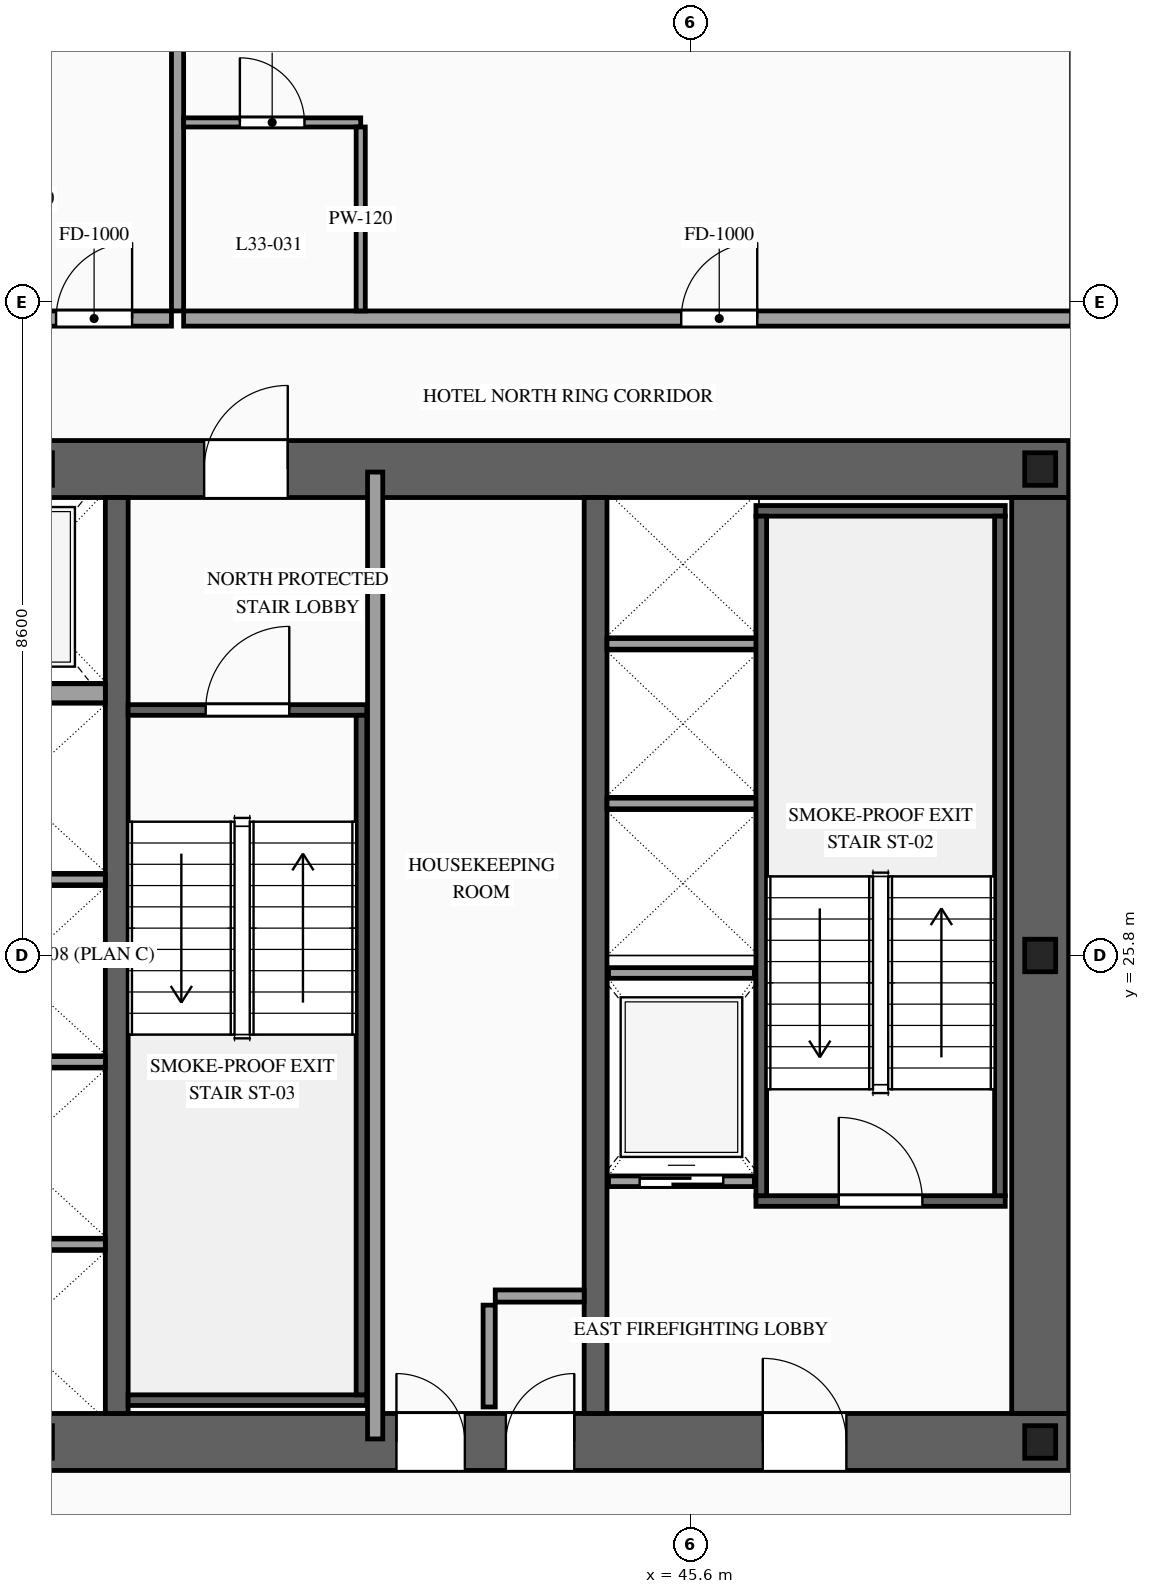
"""IFC4 building model, lengths in metres.
Left out: names, types, materials, properties, quantities, classifications, styles, units other than length and angle.
Written with IfcOpenShell. Run it as: python <this file> out.ifc"""

import sys

from ifc_helpers import new_model, si_unit, direction, frame, frame_2d, origin, origin_2d, place, context, subcontext, project, spatial, rectangle, i_section, extrude, source, transform, mapped, element, fill, save


model = new_model("IFC4")
c1 = context("Model", 3, precision=1e-05, world=origin(), true_north=direction((0.0, 1.0)))
c2 = subcontext(c1, "Body", "Model", "MODEL_VIEW")
j1 = project(units=[si_unit("LENGTHUNIT", "METRE"), si_unit("PLANEANGLEUNIT", "RADIAN")], contexts=[c1])
p1 = place(None, origin())
s1 = spatial("IfcSite", under=j1, at=p1, CompositionType="ELEMENT")
p2 = place(p1, origin())
s2 = spatial("IfcBuilding", under=s1, at=p2, CompositionType="ELEMENT")
p3 = place(p2, frame((0.0, 0.0, 126.2)))
s3 = spatial("IfcBuildingStorey", under=s2, at=p3, CompositionType="ELEMENT", Elevation=126.2)
p4 = place(p3, frame((23.425, 19.4, 0.0), z_axis=(0.0, 0.0, 1.0), x_axis=(1.0, 0.0, 0.0)))
e1 = element("IfcWall", 1, at=p4, inside=s3, PredefinedType="SHEAR", context=c2, shape_type="SweptSolid", body=[
    extrude(rectangle(XDim=27.15, YDim=0.75, at=frame_2d((13.575, 0.0))), origin(), (0.0, 0.0, 1.0), 3.6),
])
p5 = place(p4, frame((2.025, 0.0, 0.0)))
e2 = element("IfcOpeningElement", 2, at=p5, cuts=e1, PredefinedType="OPENING", context=c2, shape_type="SweptSolid", body=[
    extrude(rectangle(XDim=1.1, YDim=2.2, at=frame_2d((0.55, 1.1))), frame((0.0, 0.39, 0.0), z_axis=(0.0, -1.0, 0.0), x_axis=(1.0, 0.0, 0.0)), (0.0, 0.0, 1.0), 0.78),
])
p6 = place(p4, frame((9.925, 0.0, 0.0)))
e3 = element("IfcOpeningElement", 3, at=p6, cuts=e1, PredefinedType="OPENING", context=c2, shape_type="SweptSolid", body=[
    extrude(rectangle(XDim=1.1, YDim=2.2, at=frame_2d((0.55, 1.1))), frame((0.0, 0.39, 0.0), z_axis=(0.0, -1.0, 0.0), x_axis=(1.0, 0.0, 0.0)), (0.0, 0.0, 1.0), 0.78),
])
p7 = place(p4, frame((23.125, 0.0, 0.0)))
e4 = element("IfcOpeningElement", 4, at=p7, cuts=e1, PredefinedType="OPENING", context=c2, shape_type="SweptSolid", body=[
    extrude(rectangle(XDim=1.1, YDim=2.2, at=frame_2d((0.55, 1.1))), frame((0.0, 0.39, 0.0), z_axis=(0.0, -1.0, 0.0), x_axis=(1.0, 0.0, 0.0)), (0.0, 0.0, 1.0), 0.78),
])
p8 = place(p4, frame((19.745, 0.0, 0.0)))
e5 = element("IfcOpeningElement", 5, at=p8, cuts=e1, PredefinedType="OPENING", context=c2, shape_type="SweptSolid", body=[
    extrude(rectangle(XDim=0.9, YDim=2.15, at=frame_2d((0.45, 1.075))), frame((0.0, 0.39, 0.0), z_axis=(0.0, -1.0, 0.0), x_axis=(1.0, 0.0, 0.0)), (0.0, 0.0, 1.0), 0.78),
])
p9 = place(p4, frame((18.305, 0.0, 0.0)))
e6 = element("IfcOpeningElement", 6, at=p9, cuts=e1, PredefinedType="OPENING", context=c2, shape_type="SweptSolid", body=[
    extrude(rectangle(XDim=0.9, YDim=2.15, at=frame_2d((0.45, 1.075))), frame((0.0, 0.39, 0.0), z_axis=(0.0, -1.0, 0.0), x_axis=(1.0, 0.0, 0.0)), (0.0, 0.0, 1.0), 0.78),
])
p10 = place(p3, frame((23.425, 32.2, 0.0), z_axis=(0.0, 0.0, 1.0), x_axis=(1.0, 0.0, 0.0)))
e7 = element("IfcWall", 7, at=p10, inside=s3, PredefinedType="SHEAR", context=c2, shape_type="SweptSolid", body=[
    extrude(rectangle(XDim=27.15, YDim=0.75, at=frame_2d((13.575, 0.0))), origin(), (0.0, 0.0, 1.0), 3.6),
])
p11 = place(p10, frame((4.645, 0.0, 0.0)))
e8 = element("IfcOpeningElement", 8, at=p11, cuts=e7, PredefinedType="OPENING", context=c2, shape_type="SweptSolid", body=[
    extrude(rectangle(XDim=0.9, YDim=2.15, at=frame_2d((0.45, 1.075))), frame((0.0, 0.39, 0.0), z_axis=(0.0, -1.0, 0.0), x_axis=(1.0, 0.0, 0.0)), (0.0, 0.0, 1.0), 0.78),
])
p12 = place(p10, frame((9.925, 0.0, 0.0)))
e9 = element("IfcOpeningElement", 9, at=p12, cuts=e7, PredefinedType="OPENING", context=c2, shape_type="SweptSolid", body=[
    extrude(rectangle(XDim=1.1, YDim=2.2, at=frame_2d((0.55, 1.1))), frame((0.0, 0.39, 0.0), z_axis=(0.0, -1.0, 0.0), x_axis=(1.0, 0.0, 0.0)), (0.0, 0.0, 1.0), 0.78),
])
p13 = place(p10, frame((15.775, 0.0, 0.0)))
e10 = element("IfcOpeningElement", 10, at=p13, cuts=e7, PredefinedType="OPENING", context=c2, shape_type="SweptSolid", body=[
    extrude(rectangle(XDim=1.1, YDim=2.2, at=frame_2d((0.55, 1.1))), frame((0.0, 0.39, 0.0), z_axis=(0.0, -1.0, 0.0), x_axis=(1.0, 0.0, 0.0)), (0.0, 0.0, 1.0), 0.78),
])
m1 = source(origin(), c2, "Body", "SweptSolid", [
    extrude(rectangle(XDim=12.05, YDim=0.75, at=frame_2d((6.025, 0.0))), origin(), (0.0, 0.0, 1.0), 3.6),
])
p14 = place(p3, frame((50.2, 19.775, 0.0), z_axis=(0.0, 0.0, 1.0), x_axis=(0.0, 1.0, 0.0)))
e11 = element("IfcWall", 11, at=p14, inside=s3, PredefinedType="SHEAR", context=c2, shape_type="MappedRepresentation", body=[
    mapped(m1, transform((0.0, 0.0, 0.0), scale=1.0)),
])
m2 = source(origin(), c2, "Body", "SweptSolid", [
    extrude(rectangle(XDim=12.05, YDim=0.3, at=frame_2d((6.025, 0.0))), origin(), (0.0, 0.0, 1.0), 3.6),
])
for number, where, z_axis, x_axis in (
    (12, (38.05, 19.775, 0.0), (0.0, 0.0, 1.0), (0.0, 1.0, 0.0)),
    (13, (44.35, 19.775, 0.0), (0.0, 0.0, 1.0), (0.0, 1.0, 0.0)),
):
    element("IfcWall", number, at=place(p3, frame(where, z_axis=z_axis, x_axis=x_axis)), inside=s3, PredefinedType="SOLIDWALL", context=c2, shape_type="MappedRepresentation", body=[
        mapped(m2, transform((0.0, 0.0, 0.0), scale=1.0)),
    ])
m3 = source(origin(), c2, "Body", "SweptSolid", [
    extrude(i_section(OverallWidth=0.407, OverallDepth=0.428, WebThickness=0.02, FlangeThickness=0.035, at=origin_2d()), origin(), (0.0, 0.0, 1.0), 3.6),
])
for number, where, z_axis, x_axis in (
    (14, (37.0, 19.4, 0.0), (0.0, 0.0, 1.0), (1.0, 0.0, 0.0)),
    (15, (50.2, 19.4, 0.0), (0.0, 0.0, 1.0), (1.0, 0.0, 0.0)),
    (16, (50.2, 25.8, 0.0), (0.0, 0.0, 1.0), (1.0, 0.0, 0.0)),
    (17, (37.0, 32.2, 0.0), (0.0, 0.0, 1.0), (1.0, 0.0, 0.0)),
    (18, (50.2, 32.2, 0.0), (0.0, 0.0, 1.0), (1.0, 0.0, 0.0)),
):
    element("IfcColumn", number, at=place(p3, frame(where, z_axis=z_axis, x_axis=x_axis)), inside=s3, PredefinedType="COLUMN", context=c2, shape_type="MappedRepresentation", body=[
        mapped(m3, transform((0.0, 0.0, 0.0), scale=1.0)),
    ])
p15 = place(p3, frame((44.52, 22.83, 0.0), z_axis=(0.0, 0.0, 1.0), x_axis=(1.0, 0.0, 0.0)))
e19 = element("IfcWall", 19, at=p15, inside=s3, PredefinedType="SOLIDWALL", context=c2, shape_type="SweptSolid", body=[
    extrude(rectangle(XDim=1.92, YDim=0.14, at=frame_2d((0.96, 0.0))), origin(), (0.0, 0.0, 1.0), 3.32),
])
p16 = place(p15, frame((0.41, 0.0, 0.0)))
e20 = element("IfcOpeningElement", 20, at=p16, cuts=e19, PredefinedType="OPENING", context=c2, shape_type="SweptSolid", body=[
    extrude(rectangle(XDim=1.1, YDim=2.2, at=frame_2d((0.55, 1.1))), frame((0.0, 0.085, 0.0), z_axis=(0.0, -1.0, 0.0), x_axis=(1.0, 0.0, 0.0)), (0.0, 0.0, 1.0), 0.17),
])
m4 = source(origin(), c2, "Body", "SweptSolid", [
    extrude(rectangle(XDim=1.92, YDim=0.14, at=frame_2d((0.96, 0.0))), origin(), (0.0, 0.0, 1.0), 3.32),
])
p17 = place(p3, frame((44.52, 25.57, 0.0), z_axis=(0.0, 0.0, 1.0), x_axis=(1.0, 0.0, 0.0)))
e21 = element("IfcWall", 21, at=p17, inside=s3, PredefinedType="SOLIDWALL", context=c2, shape_type="MappedRepresentation", body=[
    mapped(m4, transform((0.0, 0.0, 0.0), scale=1.0)),
])
m5 = source(origin(), c2, "Body", "SweptSolid", [
    extrude(rectangle(XDim=2.4, YDim=0.14, at=frame_2d((1.2, 0.0))), origin(), (0.0, 0.0, 1.0), 3.32),
])
for number, where, z_axis, x_axis in (
    (22, (35.5, 22.0, 0.0), (0.0, 0.0, 1.0), (1.0, 0.0, 0.0)),
    (23, (35.5, 24.4, 0.0), (0.0, 0.0, 1.0), (1.0, 0.0, 0.0)),
    (24, (35.5, 26.8, 0.0), (0.0, 0.0, 1.0), (1.0, 0.0, 0.0)),
):
    element("IfcWall", number, at=place(p3, frame(where, z_axis=z_axis, x_axis=x_axis)), inside=s3, PredefinedType="SOLIDWALL", context=c2, shape_type="MappedRepresentation", body=[
        mapped(m5, transform((0.0, 0.0, 0.0), scale=1.0)),
    ])
m6 = source(origin(), c2, "Body", "SweptSolid", [
    extrude(rectangle(XDim=2.4, YDim=0.25, at=frame_2d((1.2, 0.0))), origin(), (0.0, 0.0, 1.0), 3.32),
])
p18 = place(p3, frame((35.5, 29.25, 0.0), z_axis=(0.0, 0.0, 1.0), x_axis=(1.0, 0.0, 0.0)))
e25 = element("IfcWall", 25, at=p18, inside=s3, PredefinedType="SOLIDWALL", context=c2, shape_type="MappedRepresentation", body=[
    mapped(m6, transform((0.0, 0.0, 0.0), scale=1.0)),
])
m7 = source(origin(), c2, "Body", "SweptSolid", [
    extrude(rectangle(XDim=2.0, YDim=0.14, at=frame_2d((1.0, 0.0))), origin(), (0.0, 0.0, 1.0), 3.32),
])
for number, where, z_axis, x_axis in (
    (26, (44.5, 27.8, 0.0), (0.0, 0.0, 1.0), (1.0, 0.0, 0.0)),
    (27, (44.5, 29.9, 0.0), (0.0, 0.0, 1.0), (1.0, 0.0, 0.0)),
):
    element("IfcWall", number, at=place(p3, frame(where, z_axis=z_axis, x_axis=x_axis)), inside=s3, PredefinedType="SOLIDWALL", context=c2, shape_type="MappedRepresentation", body=[
        mapped(m7, transform((0.0, 0.0, 0.0), scale=1.0)),
    ])
p19 = place(p3, frame((46.46, 22.57, 0.0), z_axis=(0.0, 0.0, 1.0), x_axis=(1.0, 0.0, 0.0)))
e28 = element("IfcWall", 28, at=p19, inside=s3, PredefinedType="SOLIDWALL", context=c2, shape_type="SweptSolid", body=[
    extrude(rectangle(XDim=3.28, YDim=0.14, at=frame_2d((1.64, 0.0))), origin(), (0.0, 0.0, 1.0), 3.32),
])
p20 = place(p19, frame((1.09, 0.0, 0.0)))
e29 = element("IfcOpeningElement", 29, at=p20, cuts=e28, PredefinedType="OPENING", context=c2, shape_type="SweptSolid", body=[
    extrude(rectangle(XDim=1.1, YDim=2.2, at=frame_2d((0.55, 1.1))), frame((0.0, 0.085, 0.0), z_axis=(0.0, -1.0, 0.0), x_axis=(1.0, 0.0, 0.0)), (0.0, 0.0, 1.0), 0.17),
])
m8 = source(origin(), c2, "Body", "SweptSolid", [
    extrude(rectangle(XDim=3.28, YDim=0.14, at=frame_2d((1.64, 0.0))), origin(), (0.0, 0.0, 1.0), 3.32),
])
p21 = place(p3, frame((46.46, 31.65, 0.0), z_axis=(0.0, 0.0, 1.0), x_axis=(1.0, 0.0, 0.0)))
e30 = element("IfcWall", 30, at=p21, inside=s3, PredefinedType="SOLIDWALL", context=c2, shape_type="MappedRepresentation", body=[
    mapped(m8, transform((0.0, 0.0, 0.0), scale=1.0)),
])
m9 = source(origin(), c2, "Body", "SweptSolid", [
    extrude(rectangle(XDim=8.94, YDim=0.14, at=frame_2d((4.47, 0.0))), origin(), (0.0, 0.0, 1.0), 3.32),
])
for number, where, z_axis, x_axis in (
    (31, (46.53, 22.64, 0.0), (0.0, 0.0, 1.0), (0.0, 1.0, 0.0)),
    (32, (49.67, 22.64, 0.0), (0.0, 0.0, 1.0), (0.0, 1.0, 0.0)),
):
    element("IfcWall", number, at=place(p3, frame(where, z_axis=z_axis, x_axis=x_axis)), inside=s3, PredefinedType="SOLIDWALL", context=c2, shape_type="MappedRepresentation", body=[
        mapped(m9, transform((0.0, 0.0, 0.0), scale=1.0)),
    ])
p22 = place(p3, frame((38.2, 29.03, 0.0), z_axis=(0.0, 0.0, 1.0), x_axis=(1.0, 0.0, 0.0)))
e33 = element("IfcWall", 33, at=p22, inside=s3, PredefinedType="SOLIDWALL", context=c2, shape_type="SweptSolid", body=[
    extrude(rectangle(XDim=3.14, YDim=0.14, at=frame_2d((1.57, 0.0))), origin(), (0.0, 0.0, 1.0), 3.32),
])
p23 = place(p22, frame((1.02, 0.0, 0.0)))
e34 = element("IfcOpeningElement", 34, at=p23, cuts=e33, PredefinedType="OPENING", context=c2, shape_type="SweptSolid", body=[
    extrude(rectangle(XDim=1.1, YDim=2.2, at=frame_2d((0.55, 1.1))), frame((0.0, 0.085, 0.0), z_axis=(0.0, -1.0, 0.0), x_axis=(1.0, 0.0, 0.0)), (0.0, 0.0, 1.0), 0.17),
])
m10 = source(origin(), c2, "Body", "SweptSolid", [
    extrude(rectangle(XDim=3.14, YDim=0.14, at=frame_2d((1.57, 0.0))), origin(), (0.0, 0.0, 1.0), 3.32),
])
p24 = place(p3, frame((38.2, 19.95, 0.0), z_axis=(0.0, 0.0, 1.0), x_axis=(1.0, 0.0, 0.0)))
e35 = element("IfcWall", 35, at=p24, inside=s3, PredefinedType="SOLIDWALL", context=c2, shape_type="MappedRepresentation", body=[
    mapped(m10, transform((0.0, 0.0, 0.0), scale=1.0)),
])
m11 = source(origin(), c2, "Body", "SweptSolid", [
    extrude(rectangle(XDim=8.94, YDim=0.14, at=frame_2d((4.47, 0.0))), origin(), (0.0, 0.0, 1.0), 3.32),
])
p25 = place(p3, frame((41.27, 20.02, 0.0), z_axis=(0.0, 0.0, 1.0), x_axis=(0.0, 1.0, 0.0)))
e36 = element("IfcWall", 36, at=p25, inside=s3, PredefinedType="SOLIDWALL", context=c2, shape_type="MappedRepresentation", body=[
    mapped(m11, transform((0.0, 0.0, 0.0), scale=1.0)),
])
m12 = source(origin(), c2, "Body", "SweptSolid", [
    extrude(rectangle(XDim=1.34, YDim=0.16, at=frame_2d((0.67, 0.0))), origin(), (0.0, 0.0, 1.0), 3.32),
])
p26 = place(p3, frame((42.95, 19.86, 0.0), z_axis=(0.0, 0.0, 1.0), x_axis=(0.0, 1.0, 0.0)))
e37 = element("IfcWall", 37, at=p26, inside=s3, PredefinedType="PARTITIONING", context=c2, shape_type="MappedRepresentation", body=[
    mapped(m12, transform((0.0, 0.0, 0.0), scale=1.0)),
])
m13 = source(origin(), c2, "Body", "SweptSolid", [
    extrude(rectangle(XDim=1.17, YDim=0.16, at=frame_2d((0.585, 0.0))), origin(), (0.0, 0.0, 1.0), 3.32),
])
p27 = place(p3, frame((43.03, 21.32, 0.0), z_axis=(0.0, 0.0, 1.0), x_axis=(1.0, 0.0, 0.0)))
e38 = element("IfcWall", 38, at=p27, inside=s3, PredefinedType="PARTITIONING", context=c2, shape_type="MappedRepresentation", body=[
    mapped(m13, transform((0.0, 0.0, 0.0), scale=1.0)),
])
m14 = source(origin(), c2, "Body", "SweptSolid", [
    extrude(rectangle(XDim=12.72, YDim=0.2, at=frame_2d((6.36, 0.0))), origin(), (0.0, 0.0, 1.0), 3.32),
])
p28 = place(p3, frame((41.45, 19.44, 0.0), z_axis=(0.0, 0.0, 1.0), x_axis=(0.0, 1.0, 0.0)))
e39 = element("IfcWall", 39, at=p28, inside=s3, PredefinedType="PARTITIONING", context=c2, shape_type="MappedRepresentation", body=[
    mapped(m14, transform((0.0, 0.0, 0.0), scale=1.0)),
])
p29 = place(p3, frame((34.325, 34.18, 0.0), z_axis=(0.0, 0.0, 1.0), x_axis=(1.0, 0.0, 0.0)))
e40 = element("IfcWall", 40, at=p29, inside=s3, PredefinedType="PARTITIONING", context=c2, shape_type="SweptSolid", body=[
    extrude(rectangle(XDim=4.445, YDim=0.2, at=frame_2d((2.223, 0.0))), origin(), (0.0, 0.0, 1.0), 3.32),
])
p30 = place(p29, frame((2.927, 0.0, 0.0)))
e41 = element("IfcOpeningElement", 41, at=p30, cuts=e40, PredefinedType="OPENING", context=c2, shape_type="SweptSolid", body=[
    extrude(rectangle(XDim=1.0, YDim=2.2, at=frame_2d((0.5, 1.1))), frame((0.0, 0.115, 0.0), z_axis=(0.0, -1.0, 0.0), x_axis=(1.0, 0.0, 0.0)), (0.0, 0.0, 1.0), 0.23),
])
m15 = source(origin(), c2, "Body", "SweptSolid", [
    extrude(rectangle(XDim=14.97, YDim=0.16, at=frame_2d((7.485, 0.0))), origin(), (0.0, 0.0, 1.0), 3.32),
])
p31 = place(p3, frame((38.85, 34.28, 0.0), z_axis=(0.0, 0.0, 1.0), x_axis=(0.0, 1.0, 0.0)))
e42 = element("IfcWall", 42, at=p31, inside=s3, PredefinedType="PARTITIONING", context=c2, shape_type="MappedRepresentation", body=[
    mapped(m15, transform((0.0, 0.0, 0.0), scale=1.0)),
])
p32 = place(p3, frame((38.93, 34.18, 0.0), z_axis=(0.0, 0.0, 1.0), x_axis=(1.0, 0.0, 0.0)))
e43 = element("IfcWall", 43, at=p32, inside=s3, PredefinedType="PARTITIONING", context=c2, shape_type="SweptSolid", body=[
    extrude(rectangle(XDim=11.683, YDim=0.2, at=frame_2d((5.842, 0.0))), origin(), (0.0, 0.0, 1.0), 3.32),
])
p33 = place(p32, frame((6.547, 0.0, 0.0)))
e44 = element("IfcOpeningElement", 44, at=p33, cuts=e43, PredefinedType="OPENING", context=c2, shape_type="SweptSolid", body=[
    extrude(rectangle(XDim=1.0, YDim=2.2, at=frame_2d((0.5, 1.1))), frame((0.0, 0.115, 0.0), z_axis=(0.0, -1.0, 0.0), x_axis=(1.0, 0.0, 0.0)), (0.0, 0.0, 1.0), 0.23),
])
p34 = place(p3, frame((38.93, 36.76, 0.0), z_axis=(0.0, 0.0, 1.0), x_axis=(1.0, 0.0, 0.0)))
e45 = element("IfcWall", 45, at=p34, inside=s3, PredefinedType="PARTITIONING", context=c2, shape_type="SweptSolid", body=[
    extrude(rectangle(XDim=2.33, YDim=0.12, at=frame_2d((1.165, 0.0))), origin(), (0.0, 0.0, 1.0), 3.32),
])
p35 = place(p34, frame((0.74, 0.0, 0.0)))
e46 = element("IfcOpeningElement", 46, at=p35, cuts=e45, PredefinedType="OPENING", context=c2, shape_type="SweptSolid", body=[
    extrude(rectangle(XDim=0.85, YDim=2.1, at=frame_2d((0.425, 1.05))), frame((0.0, 0.075, 0.0), z_axis=(0.0, -1.0, 0.0), x_axis=(1.0, 0.0, 0.0)), (0.0, 0.0, 1.0), 0.15),
])
m16 = source(origin(), c2, "Body", "SweptSolid", [
    extrude(rectangle(XDim=2.42, YDim=0.12, at=frame_2d((1.21, 0.0))), origin(), (0.0, 0.0, 1.0), 3.32),
])
p36 = place(p3, frame((41.26, 34.28, 0.0), z_axis=(0.0, 0.0, 1.0), x_axis=(0.0, 1.0, 0.0)))
e47 = element("IfcWall", 47, at=p36, inside=s3, PredefinedType="PARTITIONING", context=c2, shape_type="MappedRepresentation", body=[
    mapped(m16, transform((0.0, 0.0, 0.0), scale=1.0)),
])
m17 = source(origin(), c2, "Body", "SweptSolid", [
    extrude(rectangle(XDim=1.1, YDim=2.2, at=frame_2d((0.55, 1.1))), frame((0.0, 0.025, 0.0), z_axis=(0.0, -1.0, 0.0), x_axis=(1.0, 0.0, 0.0)), (0.0, 0.0, 1.0), 0.05),
])
p37 = place(p16, origin())
e48 = element("IfcDoor", 48, at=p37, inside=s3, OperationType="SLIDING_TO_RIGHT", PredefinedType="DOOR", context=c2, shape_type="MappedRepresentation", body=[
    mapped(m17, transform((0.0, 0.0, 0.0), scale=1.0)),
])
fill(e20, e48)
m18 = source(origin(), c2, "Body", "SweptSolid", [
    extrude(rectangle(XDim=1.1, YDim=2.2, at=frame_2d((0.55, 1.1))), frame((0.0, 0.025, 0.0), z_axis=(0.0, -1.0, 0.0), x_axis=(1.0, 0.0, 0.0)), (0.0, 0.0, 1.0), 0.05),
])
p38 = place(p20, origin())
e49 = element("IfcDoor", 49, at=p38, inside=s3, OperationType="SINGLE_SWING_LEFT", PredefinedType="DOOR", context=c2, shape_type="MappedRepresentation", body=[
    mapped(m18, transform((0.0, 0.0, 0.0), scale=1.0)),
])
fill(e29, e49)
p39 = place(p23, origin())
e50 = element("IfcDoor", 50, at=p39, inside=s3, OperationType="SINGLE_SWING_RIGHT", PredefinedType="DOOR", context=c2, shape_type="MappedRepresentation", body=[
    mapped(m18, transform((0.0, 0.0, 0.0), scale=1.0)),
])
fill(e34, e50)
p40 = place(p7, origin())
e51 = element("IfcDoor", 51, at=p40, inside=s3, OperationType="SINGLE_SWING_LEFT", PredefinedType="DOOR", context=c2, shape_type="MappedRepresentation", body=[
    mapped(m18, transform((0.0, 0.0, 0.0), scale=1.0)),
])
fill(e4, e51)
p41 = place(p13, origin())
e52 = element("IfcDoor", 52, at=p41, inside=s3, OperationType="SINGLE_SWING_RIGHT", PredefinedType="DOOR", context=c2, shape_type="MappedRepresentation", body=[
    mapped(m18, transform((0.0, 0.0, 0.0), scale=1.0)),
])
fill(e10, e52)
m19 = source(origin(), c2, "Body", "SweptSolid", [
    extrude(rectangle(XDim=0.9, YDim=2.15, at=frame_2d((0.45, 1.075))), frame((0.0, 0.025, 0.0), z_axis=(0.0, -1.0, 0.0), x_axis=(1.0, 0.0, 0.0)), (0.0, 0.0, 1.0), 0.05),
])
p42 = place(p8, origin())
e53 = element("IfcDoor", 53, at=p42, inside=s3, OperationType="SINGLE_SWING_RIGHT", PredefinedType="DOOR", context=c2, shape_type="MappedRepresentation", body=[
    mapped(m19, transform((0.0, 0.0, 0.0), scale=1.0)),
])
fill(e5, e53)
p43 = place(p9, origin())
e54 = element("IfcDoor", 54, at=p43, inside=s3, OperationType="SINGLE_SWING_LEFT", PredefinedType="DOOR", context=c2, shape_type="MappedRepresentation", body=[
    mapped(m19, transform((0.0, 0.0, 0.0), scale=1.0)),
])
fill(e6, e54)
m20 = source(origin(), c2, "Body", "SweptSolid", [
    extrude(rectangle(XDim=1.0, YDim=2.2, at=frame_2d((0.5, 1.1))), frame((0.0, 0.025, 0.0), z_axis=(0.0, -1.0, 0.0), x_axis=(1.0, 0.0, 0.0)), (0.0, 0.0, 1.0), 0.05),
])
p44 = place(p30, origin())
e55 = element("IfcDoor", 55, at=p44, inside=s3, OperationType="SINGLE_SWING_RIGHT", PredefinedType="DOOR", context=c2, shape_type="MappedRepresentation", body=[
    mapped(m20, transform((0.0, 0.0, 0.0), scale=1.0)),
])
fill(e41, e55)
p45 = place(p33, origin())
e56 = element("IfcDoor", 56, at=p45, inside=s3, OperationType="SINGLE_SWING_RIGHT", PredefinedType="DOOR", context=c2, shape_type="MappedRepresentation", body=[
    mapped(m20, transform((0.0, 0.0, 0.0), scale=1.0)),
])
fill(e44, e56)
m21 = source(origin(), c2, "Body", "SweptSolid", [
    extrude(rectangle(XDim=0.85, YDim=2.1, at=frame_2d((0.425, 1.05))), frame((0.0, 0.025, 0.0), z_axis=(0.0, -1.0, 0.0), x_axis=(1.0, 0.0, 0.0)), (0.0, 0.0, 1.0), 0.05),
])
p46 = place(p35, origin())
e57 = element("IfcDoor", 57, at=p46, inside=s3, OperationType="SINGLE_SWING_LEFT", PredefinedType="DOOR", context=c2, shape_type="MappedRepresentation", body=[
    mapped(m21, transform((0.0, 0.0, 0.0), scale=1.0)),
])
fill(e46, e57)
save(model, sys.argv[1])
